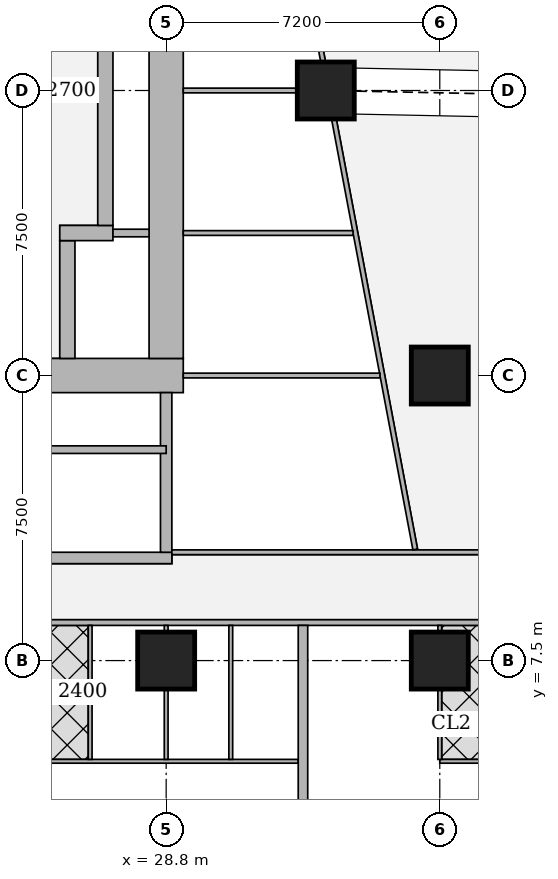
"""IFC4 building model, lengths in metres.
Left out: names, types, materials, properties, quantities, classifications, styles, units other than length and angle.
Written with IfcOpenShell. Run it as: python <this file> out.ifc"""

import sys

from ifc_helpers import new_model, si_unit, direction, frame, frame_2d, origin, origin_2d, place, context, subcontext, project, spatial, rectangle, extrude, element, fill, save


model = new_model("IFC4")
c1 = context("Model", 3, precision=1e-05, world=origin(), true_north=direction((0.0, 1.0)))
c2 = subcontext(c1, "Body", "Model", "MODEL_VIEW")
j1 = project(units=[si_unit("LENGTHUNIT", "METRE"), si_unit("PLANEANGLEUNIT", "RADIAN")], contexts=[c1])
p1 = place(None, origin())
s1 = spatial("IfcSite", under=j1, at=p1, CompositionType="ELEMENT")
p2 = place(p1, origin())
s2 = spatial("IfcBuilding", under=s1, at=p2, CompositionType="ELEMENT")
p3 = place(p2, frame((0.0, 0.0, 139.55)))
s3 = spatial("IfcBuildingStorey", under=s2, at=p3, CompositionType="ELEMENT", Elevation=139.55)
for number, where, z_axis, x_axis in (
    (1, (28.8, 7.5, 0.0), (0.0, 0.0, 1.0), (1.0, 0.0, 0.0)),
    (2, (36.0, 7.5, 0.0), (0.0, 0.0, 1.0), (1.0, 0.0, 0.0)),
    (3, (36.0, 15.0, 0.0), (0.0, 0.0, 1.0), (1.0, 0.0, 0.0)),
    (4, (33.0, 22.5, 0.0), (0.0, 0.0, 1.0), (1.0, 0.0, 0.0)),
):
    element("IfcColumn", number, at=place(p3, frame(where, z_axis=z_axis, x_axis=x_axis)), inside=s3, PredefinedType="COLUMN", context=c2, shape_type="SweptSolid", body=[
        extrude(rectangle(XDim=1.5, YDim=1.5, at=origin_2d()), origin(), (0.0, 0.0, 1.0), 3.75),
    ])
p4 = place(p3, frame((13.95, 15.0, 0.0), z_axis=(0.0, 0.0, 1.0), x_axis=(1.0, 0.0, 0.0)))
e5 = element("IfcWall", 5, at=p4, inside=s3, PredefinedType="SHEAR", context=c2, shape_type="SweptSolid", body=[
    extrude(rectangle(XDim=15.3, YDim=0.9, at=frame_2d((7.65, 0.0))), origin(), (0.0, 0.0, 1.0), 3.75),
])
p5 = place(p4, frame((4.45, 0.0, 0.0)))
e6 = element("IfcOpeningElement", 6, at=p5, cuts=e5, PredefinedType="OPENING", context=c2, shape_type="SweptSolid", body=[
    extrude(rectangle(XDim=1.8, YDim=2.1, at=frame_2d((0.9, 1.05))), frame((0.0, 0.46, 0.0), z_axis=(0.0, -1.0, 0.0), x_axis=(1.0, 0.0, 0.0)), (0.0, 0.0, 1.0), 0.92),
])
p6 = place(p4, frame((10.7, 0.0, 0.0)))
e7 = element("IfcOpeningElement", 7, at=p6, cuts=e5, PredefinedType="OPENING", context=c2, shape_type="SweptSolid", body=[
    extrude(rectangle(XDim=1.1, YDim=2.1, at=frame_2d((0.55, 1.05))), frame((0.0, 0.46, 0.0), z_axis=(0.0, -1.0, 0.0), x_axis=(1.0, 0.0, 0.0)), (0.0, 0.0, 1.0), 0.92),
])
p7 = place(p3, frame((28.8, 15.45, 0.0), z_axis=(0.0, 0.0, 1.0), x_axis=(0.0, 1.0, 0.0)))
e8 = element("IfcWall", 8, at=p7, inside=s3, PredefinedType="SHEAR", context=c2, shape_type="SweptSolid", body=[
    extrude(rectangle(XDim=14.1, YDim=0.9, at=frame_2d((7.05, 0.0))), origin(), (0.0, 0.0, 1.0), 3.75),
])
p8 = place(p3, frame((26.2, 15.45, 0.0), z_axis=(0.0, 0.0, 1.0), x_axis=(0.0, 1.0, 0.0)))
e9 = element("IfcWall", 9, at=p8, inside=s3, PredefinedType="SHEAR", context=c2, shape_type="SweptSolid", body=[
    extrude(rectangle(XDim=3.1, YDim=0.4, at=frame_2d((1.55, 0.0))), origin(), (0.0, 0.0, 1.0), 3.75),
])
p9 = place(p8, frame((0.825, 0.0, 0.0)))
e10 = element("IfcOpeningElement", 10, at=p9, cuts=e9, PredefinedType="OPENING", context=c2, shape_type="SweptSolid", body=[
    extrude(rectangle(XDim=1.2, YDim=2.1, at=frame_2d((0.6, 1.05))), frame((0.0, 0.21, 0.0), z_axis=(0.0, -1.0, 0.0), x_axis=(1.0, 0.0, 0.0)), (0.0, 0.0, 1.0), 0.42),
])
p10 = place(p3, frame((26.0, 18.75, 0.0), z_axis=(0.0, 0.0, 1.0), x_axis=(1.0, 0.0, 0.0)))
e11 = element("IfcWall", 11, at=p10, inside=s3, PredefinedType="SHEAR", context=c2, shape_type="SweptSolid", body=[
    extrude(rectangle(XDim=1.4, YDim=0.4, at=frame_2d((0.7, 0.0))), origin(), (0.0, 0.0, 1.0), 3.75),
])
p11 = place(p3, frame((27.2, 18.95, 0.0), z_axis=(0.0, 0.0, 1.0), x_axis=(0.0, 1.0, 0.0)))
e12 = element("IfcWall", 12, at=p11, inside=s3, PredefinedType="SHEAR", context=c2, shape_type="SweptSolid", body=[
    extrude(rectangle(XDim=7.1, YDim=0.4, at=frame_2d((3.55, 0.0))), origin(), (0.0, 0.0, 1.0), 3.75),
])
p12 = place(p3, frame((21.45, 10.2, 0.0), z_axis=(0.0, 0.0, 1.0), x_axis=(1.0, 0.0, 0.0)))
e13 = element("IfcWall", 13, at=p12, inside=s3, PredefinedType="SHEAR", context=c2, shape_type="SweptSolid", body=[
    extrude(rectangle(XDim=7.5, YDim=0.3, at=frame_2d((3.75, 0.0))), origin(), (0.0, 0.0, 1.0), 3.75),
])
p13 = place(p12, frame((0.5, 0.0, 0.0)))
e14 = element("IfcOpeningElement", 14, at=p13, cuts=e13, PredefinedType="OPENING", context=c2, shape_type="SweptSolid", body=[
    extrude(rectangle(XDim=1.1, YDim=2.1, at=frame_2d((0.55, 1.05))), frame((0.0, 0.16, 0.0), z_axis=(0.0, -1.0, 0.0), x_axis=(1.0, 0.0, 0.0)), (0.0, 0.0, 1.0), 0.32),
])
p14 = place(p3, frame((28.8, 10.35, 0.0), z_axis=(0.0, 0.0, 1.0), x_axis=(0.0, 1.0, 0.0)))
e15 = element("IfcWall", 15, at=p14, inside=s3, PredefinedType="SHEAR", context=c2, shape_type="SweptSolid", body=[
    extrude(rectangle(XDim=4.2, YDim=0.3, at=frame_2d((2.1, 0.0))), origin(), (0.0, 0.0, 1.0), 3.75),
])
p15 = place(p3, frame((40.053, 8.5, 0.0), z_axis=(0.0, 0.0, 1.0), x_axis=(-1.0, 0.0, 0.0)))
e16 = element("IfcWall", 16, at=p15, inside=s3, PredefinedType="SOLIDWALL", context=c2, shape_type="SweptSolid", body=[
    extrude(rectangle(XDim=31.703, YDim=0.15, at=frame_2d((15.852, 0.0))), origin(), (0.0, 0.0, 1.0), 3.5),
])
p16 = place(p15, frame((28.103, 0.0, 0.0)))
e17 = element("IfcOpeningElement", 17, at=p16, cuts=e16, PredefinedType="OPENING", context=c2, shape_type="SweptSolid", body=[
    extrude(rectangle(XDim=1.0, YDim=2.1, at=frame_2d((0.5, 1.05))), frame((0.0, 0.085, 0.0), z_axis=(0.0, -1.0, 0.0), x_axis=(1.0, 0.0, 0.0)), (0.0, 0.0, 1.0), 0.17),
])
p17 = place(p15, frame((19.853, 0.0, 0.0)))
e18 = element("IfcOpeningElement", 18, at=p17, cuts=e16, PredefinedType="OPENING", context=c2, shape_type="SweptSolid", body=[
    extrude(rectangle(XDim=1.0, YDim=2.1, at=frame_2d((0.5, 1.05))), frame((0.0, 0.085, 0.0), z_axis=(0.0, -1.0, 0.0), x_axis=(1.0, 0.0, 0.0)), (0.0, 0.0, 1.0), 0.17),
])
p18 = place(p15, frame((5.514, 0.0, 0.0)))
e19 = element("IfcOpeningElement", 19, at=p18, cuts=e16, PredefinedType="OPENING", context=c2, shape_type="SweptSolid", body=[
    extrude(rectangle(XDim=1.0, YDim=2.1, at=frame_2d((0.5, 1.05))), frame((0.0, 0.085, 0.0), z_axis=(0.0, -1.0, 0.0), x_axis=(1.0, 0.0, 0.0)), (0.0, 0.0, 1.0), 0.17),
])
p19 = place(p3, frame((33.623, 43.022, 0.0), z_axis=(0.0, 0.0, 1.0), x_axis=(0.185596841028, -0.98262597798, 0.0)))
e20 = element("IfcWall", 20, at=p19, inside=s3, PredefinedType="SOLIDWALL", context=c2, shape_type="SweptSolid", body=[
    extrude(rectangle(XDim=41.66, YDim=0.15, at=frame_2d((20.83, 0.0))), origin(), (0.0, 0.0, 1.0), 2.5),
])
p20 = place(p19, frame((20.242, 0.0, 0.0)))
e21 = element("IfcOpeningElement", 21, at=p20, cuts=e20, PredefinedType="OPENING", context=c2, shape_type="SweptSolid", body=[
    extrude(rectangle(XDim=1.0, YDim=2.1, at=frame_2d((0.5, 1.05))), frame((0.0, 0.085, 0.0), z_axis=(0.0, -1.0, 0.0), x_axis=(1.0, 0.0, 0.0)), (0.0, 0.0, 1.0), 0.17),
])
p21 = place(p19, frame((24.714, 0.0, 0.0)))
e22 = element("IfcOpeningElement", 22, at=p21, cuts=e20, PredefinedType="OPENING", context=c2, shape_type="SweptSolid", body=[
    extrude(rectangle(XDim=1.0, YDim=2.1, at=frame_2d((0.5, 1.05))), frame((0.0, 0.085, 0.0), z_axis=(0.0, -1.0, 0.0), x_axis=(1.0, 0.0, 0.0)), (0.0, 0.0, 1.0), 0.17),
])
p22 = place(p19, frame((31.206, 0.0, 0.0)))
e23 = element("IfcOpeningElement", 23, at=p22, cuts=e20, PredefinedType="OPENING", context=c2, shape_type="SweptSolid", body=[
    extrude(rectangle(XDim=1.0, YDim=2.1, at=frame_2d((0.5, 1.05))), frame((0.0, 0.085, 0.0), z_axis=(0.0, -1.0, 0.0), x_axis=(1.0, 0.0, 0.0)), (0.0, 0.0, 1.0), 0.17),
])
p23 = place(p3, frame((32.275, 4.85, 0.0), z_axis=(0.0, 0.0, 1.0), x_axis=(-1.0, 0.0, 0.0)))
e24 = element("IfcWall", 24, at=p23, inside=s3, PredefinedType="PARTITIONING", context=c2, shape_type="SweptSolid", body=[
    extrude(rectangle(XDim=10.675, YDim=0.1, at=frame_2d((5.337, 0.0))), origin(), (0.0, 0.0, 1.0), 3.5),
])
p24 = place(p23, frame((9.2, 0.0, 0.0)))
e25 = element("IfcOpeningElement", 25, at=p24, cuts=e24, PredefinedType="OPENING", context=c2, shape_type="SweptSolid", body=[
    extrude(rectangle(XDim=0.9, YDim=2.1, at=frame_2d((0.45, 1.05))), frame((0.0, 0.06, 0.0), z_axis=(0.0, -1.0, 0.0), x_axis=(1.0, 0.0, 0.0)), (0.0, 0.0, 1.0), 0.12),
])
p25 = place(p23, frame((5.825, 0.0, 0.0)))
e26 = element("IfcOpeningElement", 26, at=p25, cuts=e24, PredefinedType="OPENING", context=c2, shape_type="SweptSolid", body=[
    extrude(rectangle(XDim=0.9, YDim=2.1, at=frame_2d((0.45, 1.05))), frame((0.0, 0.06, 0.0), z_axis=(0.0, -1.0, 0.0), x_axis=(1.0, 0.0, 0.0)), (0.0, 0.0, 1.0), 0.12),
])
p26 = place(p23, frame((2.175, 0.0, 0.0)))
e27 = element("IfcOpeningElement", 27, at=p26, cuts=e24, PredefinedType="OPENING", context=c2, shape_type="SweptSolid", body=[
    extrude(rectangle(XDim=0.9, YDim=2.1, at=frame_2d((0.45, 1.05))), frame((0.0, 0.06, 0.0), z_axis=(0.0, -1.0, 0.0), x_axis=(1.0, 0.0, 0.0)), (0.0, 0.0, 1.0), 0.12),
])
p27 = place(p23, frame((7.4, 0.0, 0.0)))
e28 = element("IfcOpeningElement", 28, at=p27, cuts=e24, PredefinedType="OPENING", context=c2, shape_type="SweptSolid", body=[
    extrude(rectangle(XDim=0.9, YDim=2.1, at=frame_2d((0.45, 1.05))), frame((0.0, 0.06, 0.0), z_axis=(0.0, -1.0, 0.0), x_axis=(1.0, 0.0, 0.0)), (0.0, 0.0, 1.0), 0.12),
])
p28 = place(p23, frame((4.025, 0.0, 0.0)))
e29 = element("IfcOpeningElement", 29, at=p28, cuts=e24, PredefinedType="OPENING", context=c2, shape_type="SweptSolid", body=[
    extrude(rectangle(XDim=0.9, YDim=2.1, at=frame_2d((0.45, 1.05))), frame((0.0, 0.06, 0.0), z_axis=(0.0, -1.0, 0.0), x_axis=(1.0, 0.0, 0.0)), (0.0, 0.0, 1.0), 0.12),
])
p29 = place(p23, frame((0.375, 0.0, 0.0)))
e30 = element("IfcOpeningElement", 30, at=p29, cuts=e24, PredefinedType="OPENING", context=c2, shape_type="SweptSolid", body=[
    extrude(rectangle(XDim=0.9, YDim=2.1, at=frame_2d((0.45, 1.05))), frame((0.0, 0.06, 0.0), z_axis=(0.0, -1.0, 0.0), x_axis=(1.0, 0.0, 0.0)), (0.0, 0.0, 1.0), 0.12),
])
p30 = place(p3, frame((28.8, 4.9, 0.0), z_axis=(0.0, 0.0, 1.0), x_axis=(0.0, 1.0, 0.0)))
e31 = element("IfcWall", 31, at=p30, inside=s3, PredefinedType="PARTITIONING", context=c2, shape_type="SweptSolid", body=[
    extrude(rectangle(XDim=1.849, YDim=0.1, at=frame_2d((0.925, 0.0))), origin(), (0.0, 0.0, 1.0), 3.5),
])
p31 = place(p3, frame((28.8, 8.251, 0.0), z_axis=(0.0, 0.0, 1.0), x_axis=(0.0, 1.0, 0.0)))
e32 = element("IfcWall", 32, at=p31, inside=s3, PredefinedType="PARTITIONING", context=c2, shape_type="SweptSolid", body=[
    extrude(rectangle(XDim=0.174, YDim=0.1, at=frame_2d((0.087, 0.0))), origin(), (0.0, 0.0, 1.0), 3.5),
])
for number, where, z_axis, x_axis in (
    (33, (26.8, 4.9, 0.0), (0.0, 0.0, 1.0), (0.0, 1.0, 0.0)),
    (34, (30.5, 4.9, 0.0), (0.0, 0.0, 1.0), (0.0, 1.0, 0.0)),
):
    element("IfcWall", number, at=place(p3, frame(where, z_axis=z_axis, x_axis=x_axis)), inside=s3, PredefinedType="PARTITIONING", context=c2, shape_type="SweptSolid", body=[
        extrude(rectangle(XDim=3.525, YDim=0.1, at=frame_2d((1.763, 0.0))), origin(), (0.0, 0.0, 1.0), 3.5),
    ])
p32 = place(p3, frame((40.747, 4.85, 0.0), z_axis=(0.0, 0.0, 1.0), x_axis=(-1.0, 0.0, 0.0)))
e35 = element("IfcWall", 35, at=p32, inside=s3, PredefinedType="PARTITIONING", context=c2, shape_type="SweptSolid", body=[
    extrude(rectangle(XDim=4.747, YDim=0.1, at=frame_2d((2.374, 0.0))), origin(), (0.0, 0.0, 1.0), 3.5),
])
p33 = place(p32, frame((3.272, 0.0, 0.0)))
e36 = element("IfcOpeningElement", 36, at=p33, cuts=e35, PredefinedType="OPENING", context=c2, shape_type="SweptSolid", body=[
    extrude(rectangle(XDim=0.9, YDim=2.1, at=frame_2d((0.45, 1.05))), frame((0.0, 0.06, 0.0), z_axis=(0.0, -1.0, 0.0), x_axis=(1.0, 0.0, 0.0)), (0.0, 0.0, 1.0), 0.12),
])
p34 = place(p32, frame((0.15, 0.0, 0.0)))
e37 = element("IfcOpeningElement", 37, at=p34, cuts=e35, PredefinedType="OPENING", context=c2, shape_type="SweptSolid", body=[
    extrude(rectangle(XDim=0.9, YDim=2.1, at=frame_2d((0.45, 1.05))), frame((0.0, 0.06, 0.0), z_axis=(0.0, -1.0, 0.0), x_axis=(1.0, 0.0, 0.0)), (0.0, 0.0, 1.0), 0.12),
])
p35 = place(p32, frame((1.472, 0.0, 0.0)))
e38 = element("IfcOpeningElement", 38, at=p35, cuts=e35, PredefinedType="OPENING", context=c2, shape_type="SweptSolid", body=[
    extrude(rectangle(XDim=0.9, YDim=2.1, at=frame_2d((0.45, 1.05))), frame((0.0, 0.06, 0.0), z_axis=(0.0, -1.0, 0.0), x_axis=(1.0, 0.0, 0.0)), (0.0, 0.0, 1.0), 0.12),
])
p36 = place(p3, frame((36.0, 4.9, 0.0), z_axis=(0.0, 0.0, 1.0), x_axis=(0.0, 1.0, 0.0)))
e39 = element("IfcWall", 39, at=p36, inside=s3, PredefinedType="PARTITIONING", context=c2, shape_type="SweptSolid", body=[
    extrude(rectangle(XDim=1.849, YDim=0.1, at=frame_2d((0.925, 0.0))), origin(), (0.0, 0.0, 1.0), 3.5),
])
p37 = place(p3, frame((36.0, 8.251, 0.0), z_axis=(0.0, 0.0, 1.0), x_axis=(0.0, 1.0, 0.0)))
e40 = element("IfcWall", 40, at=p37, inside=s3, PredefinedType="PARTITIONING", context=c2, shape_type="SweptSolid", body=[
    extrude(rectangle(XDim=0.174, YDim=0.1, at=frame_2d((0.087, 0.0))), origin(), (0.0, 0.0, 1.0), 3.5),
])
p38 = place(p3, frame((32.4, 3.65, 0.0), z_axis=(0.0, 0.0, 1.0), x_axis=(0.0, 1.0, 0.0)))
e41 = element("IfcWall", 41, at=p38, inside=s3, PredefinedType="SOLIDWALL", context=c2, shape_type="SweptSolid", body=[
    extrude(rectangle(XDim=4.775, YDim=0.25, at=frame_2d((2.388, 0.0))), origin(), (0.0, 0.0, 1.0), 3.5),
])
p39 = place(p3, frame((28.95, 10.35, 0.0), z_axis=(0.0, 0.0, 1.0), x_axis=(1.0, 0.0, 0.0)))
e42 = element("IfcWall", 42, at=p39, inside=s3, PredefinedType="PARTITIONING", context=c2, shape_type="SweptSolid", body=[
    extrude(rectangle(XDim=9.013, YDim=0.125, at=frame_2d((4.506, 0.0))), origin(), (0.0, 0.0, 1.0), 3.5),
])
p40 = place(p3, frame((35.354, 10.424, 0.0), z_axis=(0.0, 0.0, 1.0), x_axis=(-0.185612234763, 0.982623070311, 0.0)))
e43 = element("IfcWall", 43, at=p40, inside=s3, PredefinedType="PARTITIONING", context=c2, shape_type="SweptSolid", body=[
    extrude(rectangle(XDim=11.513, YDim=0.125, at=frame_2d((5.756, 0.0))), origin(), (0.0, 0.0, 1.0), 3.5),
])
p41 = place(p40, frame((0.697, 0.0, 0.0)))
e44 = element("IfcOpeningElement", 44, at=p41, cuts=e43, PredefinedType="OPENING", context=c2, shape_type="SweptSolid", body=[
    extrude(rectangle(XDim=1.0, YDim=2.1, at=frame_2d((0.5, 1.05))), frame((0.0, 0.073, 0.0), z_axis=(0.0, -1.0, 0.0), x_axis=(1.0, 0.0, 0.0)), (0.0, 0.0, 1.0), 0.145),
])
p42 = place(p40, frame((5.48, 0.0, 0.0)))
e45 = element("IfcOpeningElement", 45, at=p42, cuts=e43, PredefinedType="OPENING", context=c2, shape_type="SweptSolid", body=[
    extrude(rectangle(XDim=1.0, YDim=2.1, at=frame_2d((0.5, 1.05))), frame((0.0, 0.073, 0.0), z_axis=(0.0, -1.0, 0.0), x_axis=(1.0, 0.0, 0.0)), (0.0, 0.0, 1.0), 0.145),
])
p43 = place(p40, frame((9.296, 0.0, 0.0)))
e46 = element("IfcOpeningElement", 46, at=p43, cuts=e43, PredefinedType="OPENING", context=c2, shape_type="SweptSolid", body=[
    extrude(rectangle(XDim=1.0, YDim=2.1, at=frame_2d((0.5, 1.05))), frame((0.0, 0.073, 0.0), z_axis=(0.0, -1.0, 0.0), x_axis=(1.0, 0.0, 0.0)), (0.0, 0.0, 1.0), 0.145),
])
p44 = place(p3, frame((32.929, 23.263, 0.0), z_axis=(0.0, 0.0, 1.0), x_axis=(-0.185612234763, 0.982623070311, 0.0)))
e47 = element("IfcWall", 47, at=p44, inside=s3, PredefinedType="PARTITIONING", context=c2, shape_type="SweptSolid", body=[
    extrude(rectangle(XDim=11.513, YDim=0.125, at=frame_2d((5.756, 0.0))), origin(), (0.0, 0.0, 1.0), 3.5),
])
p45 = place(p44, frame((0.15, 0.0, 0.0)))
e48 = element("IfcOpeningElement", 48, at=p45, cuts=e47, PredefinedType="OPENING", context=c2, shape_type="SweptSolid", body=[
    extrude(rectangle(XDim=1.0, YDim=2.1, at=frame_2d((0.5, 1.05))), frame((0.0, 0.073, 0.0), z_axis=(0.0, -1.0, 0.0), x_axis=(1.0, 0.0, 0.0)), (0.0, 0.0, 1.0), 0.145),
])
p46 = place(p44, frame((7.679, 0.0, 0.0)))
e49 = element("IfcOpeningElement", 49, at=p46, cuts=e47, PredefinedType="OPENING", context=c2, shape_type="SweptSolid", body=[
    extrude(rectangle(XDim=1.0, YDim=2.1, at=frame_2d((0.5, 1.05))), frame((0.0, 0.073, 0.0), z_axis=(0.0, -1.0, 0.0), x_axis=(1.0, 0.0, 0.0)), (0.0, 0.0, 1.0), 0.145),
])
p47 = place(p3, frame((29.25, 15.0, 0.0), z_axis=(0.0, 0.0, 1.0), x_axis=(1.0, 0.0, 0.0)))
e50 = element("IfcWall", 50, at=p47, inside=s3, PredefinedType="PARTITIONING", context=c2, shape_type="SweptSolid", body=[
    extrude(rectangle(XDim=5.176, YDim=0.125, at=frame_2d((2.588, 0.0))), origin(), (0.0, 0.0, 1.0), 3.5),
])
p48 = place(p3, frame((29.25, 18.75, 0.0), z_axis=(0.0, 0.0, 1.0), x_axis=(1.0, 0.0, 0.0)))
e51 = element("IfcWall", 51, at=p48, inside=s3, PredefinedType="PARTITIONING", context=c2, shape_type="SweptSolid", body=[
    extrude(rectangle(XDim=4.467, YDim=0.125, at=frame_2d((2.233, 0.0))), origin(), (0.0, 0.0, 1.0), 3.5),
])
p49 = place(p3, frame((29.25, 22.5, 0.0), z_axis=(0.0, 0.0, 1.0), x_axis=(1.0, 0.0, 0.0)))
e52 = element("IfcWall", 52, at=p49, inside=s3, PredefinedType="PARTITIONING", context=c2, shape_type="SweptSolid", body=[
    extrude(rectangle(XDim=2.999, YDim=0.125, at=frame_2d((1.5, 0.0))), origin(), (0.0, 0.0, 1.0), 3.5),
])
p50 = place(p3, frame((23.0, 13.05, 0.0), z_axis=(0.0, 0.0, 1.0), x_axis=(1.0, 0.0, 0.0)))
e53 = element("IfcWall", 53, at=p50, inside=s3, PredefinedType="SHEAR", context=c2, shape_type="SweptSolid", body=[
    extrude(rectangle(XDim=5.8, YDim=0.2, at=frame_2d((2.9, 0.0))), origin(), (0.0, 0.0, 1.0), 3.75),
])
p51 = place(p3, frame((27.4, 18.75, 0.0), z_axis=(0.0, 0.0, 1.0), x_axis=(1.0, 0.0, 0.0)))
e54 = element("IfcWall", 54, at=p51, inside=s3, PredefinedType="SOLIDWALL", context=c2, shape_type="SweptSolid", body=[
    extrude(rectangle(XDim=0.95, YDim=0.2, at=frame_2d((0.475, 0.0))), origin(), (0.0, 0.0, 1.0), 3.5),
])
p52 = place(p25, origin())
e55 = element("IfcDoor", 55, at=p52, inside=s3, OperationType="SINGLE_SWING_RIGHT", PredefinedType="DOOR", context=c2, shape_type="SweptSolid", body=[
    extrude(rectangle(XDim=0.9, YDim=2.1, at=frame_2d((0.45, 1.05))), frame((0.0, 0.025, 0.0), z_axis=(0.0, -1.0, 0.0), x_axis=(1.0, 0.0, 0.0)), (0.0, 0.0, 1.0), 0.05),
])
fill(e26, e55)
p53 = place(p26, origin())
e56 = element("IfcDoor", 56, at=p53, inside=s3, OperationType="SINGLE_SWING_RIGHT", PredefinedType="DOOR", context=c2, shape_type="SweptSolid", body=[
    extrude(rectangle(XDim=0.9, YDim=2.1, at=frame_2d((0.45, 1.05))), frame((0.0, 0.025, 0.0), z_axis=(0.0, -1.0, 0.0), x_axis=(1.0, 0.0, 0.0)), (0.0, 0.0, 1.0), 0.05),
])
fill(e27, e56)
p54 = place(p28, origin())
e57 = element("IfcDoor", 57, at=p54, inside=s3, OperationType="SINGLE_SWING_LEFT", PredefinedType="DOOR", context=c2, shape_type="SweptSolid", body=[
    extrude(rectangle(XDim=0.9, YDim=2.1, at=frame_2d((0.45, 1.05))), frame((0.0, 0.025, 0.0), z_axis=(0.0, -1.0, 0.0), x_axis=(1.0, 0.0, 0.0)), (0.0, 0.0, 1.0), 0.05),
])
fill(e29, e57)
p55 = place(p29, origin())
e58 = element("IfcDoor", 58, at=p55, inside=s3, OperationType="SINGLE_SWING_RIGHT", PredefinedType="DOOR", context=c2, shape_type="SweptSolid", body=[
    extrude(rectangle(XDim=0.9, YDim=2.1, at=frame_2d((0.45, 1.05))), frame((0.0, 0.025, 0.0), z_axis=(0.0, -1.0, 0.0), x_axis=(1.0, 0.0, 0.0)), (0.0, 0.0, 1.0), 0.05),
])
fill(e30, e58)
p56 = place(p33, origin())
e59 = element("IfcDoor", 59, at=p56, inside=s3, OperationType="SINGLE_SWING_LEFT", PredefinedType="DOOR", context=c2, shape_type="SweptSolid", body=[
    extrude(rectangle(XDim=0.9, YDim=2.1, at=frame_2d((0.45, 1.05))), frame((0.0, 0.025, 0.0), z_axis=(0.0, -1.0, 0.0), x_axis=(1.0, 0.0, 0.0)), (0.0, 0.0, 1.0), 0.05),
])
fill(e36, e59)
p57 = place(p18, origin())
e60 = element("IfcDoor", 60, at=p57, inside=s3, OperationType="SINGLE_SWING_RIGHT", PredefinedType="DOOR", context=c2, shape_type="SweptSolid", body=[
    extrude(rectangle(XDim=1.0, YDim=2.1, at=frame_2d((0.5, 1.05))), frame((0.0, 0.025, 0.0), z_axis=(0.0, -1.0, 0.0), x_axis=(1.0, 0.0, 0.0)), (0.0, 0.0, 1.0), 0.05),
])
fill(e19, e60)
p58 = place(p41, origin())
e61 = element("IfcDoor", 61, at=p58, inside=s3, OperationType="SINGLE_SWING_LEFT", PredefinedType="DOOR", context=c2, shape_type="SweptSolid", body=[
    extrude(rectangle(XDim=1.0, YDim=2.1, at=frame_2d((0.5, 1.05))), frame((0.0, 0.025, 0.0), z_axis=(0.0, -1.0, 0.0), x_axis=(1.0, 0.0, 0.0)), (0.0, 0.0, 1.0), 0.05),
])
fill(e44, e61)
p59 = place(p42, origin())
e62 = element("IfcDoor", 62, at=p59, inside=s3, OperationType="SINGLE_SWING_LEFT", PredefinedType="DOOR", context=c2, shape_type="SweptSolid", body=[
    extrude(rectangle(XDim=1.0, YDim=2.1, at=frame_2d((0.5, 1.05))), frame((0.0, 0.025, 0.0), z_axis=(0.0, -1.0, 0.0), x_axis=(1.0, 0.0, 0.0)), (0.0, 0.0, 1.0), 0.05),
])
fill(e45, e62)
p60 = place(p43, origin())
e63 = element("IfcDoor", 63, at=p60, inside=s3, OperationType="SINGLE_SWING_LEFT", PredefinedType="DOOR", context=c2, shape_type="SweptSolid", body=[
    extrude(rectangle(XDim=1.0, YDim=2.1, at=frame_2d((0.5, 1.05))), frame((0.0, 0.025, 0.0), z_axis=(0.0, -1.0, 0.0), x_axis=(1.0, 0.0, 0.0)), (0.0, 0.0, 1.0), 0.05),
])
fill(e46, e63)
p61 = place(p45, origin())
e64 = element("IfcDoor", 64, at=p61, inside=s3, OperationType="SINGLE_SWING_LEFT", PredefinedType="DOOR", context=c2, shape_type="SweptSolid", body=[
    extrude(rectangle(XDim=1.0, YDim=2.1, at=frame_2d((0.5, 1.05))), frame((0.0, 0.025, 0.0), z_axis=(0.0, -1.0, 0.0), x_axis=(1.0, 0.0, 0.0)), (0.0, 0.0, 1.0), 0.05),
])
fill(e48, e64)
p62 = place(p9, origin())
e65 = element("IfcDoor", 65, at=p62, inside=s3, OperationType="DOUBLE_DOOR_SLIDING", PredefinedType="DOOR", context=c2, shape_type="SweptSolid", body=[
    extrude(rectangle(XDim=1.2, YDim=2.1, at=frame_2d((0.6, 1.05))), frame((0.0, 0.025, 0.0), z_axis=(0.0, -1.0, 0.0), x_axis=(1.0, 0.0, 0.0)), (0.0, 0.0, 1.0), 0.05),
])
fill(e10, e65)
save(model, sys.argv[1])
